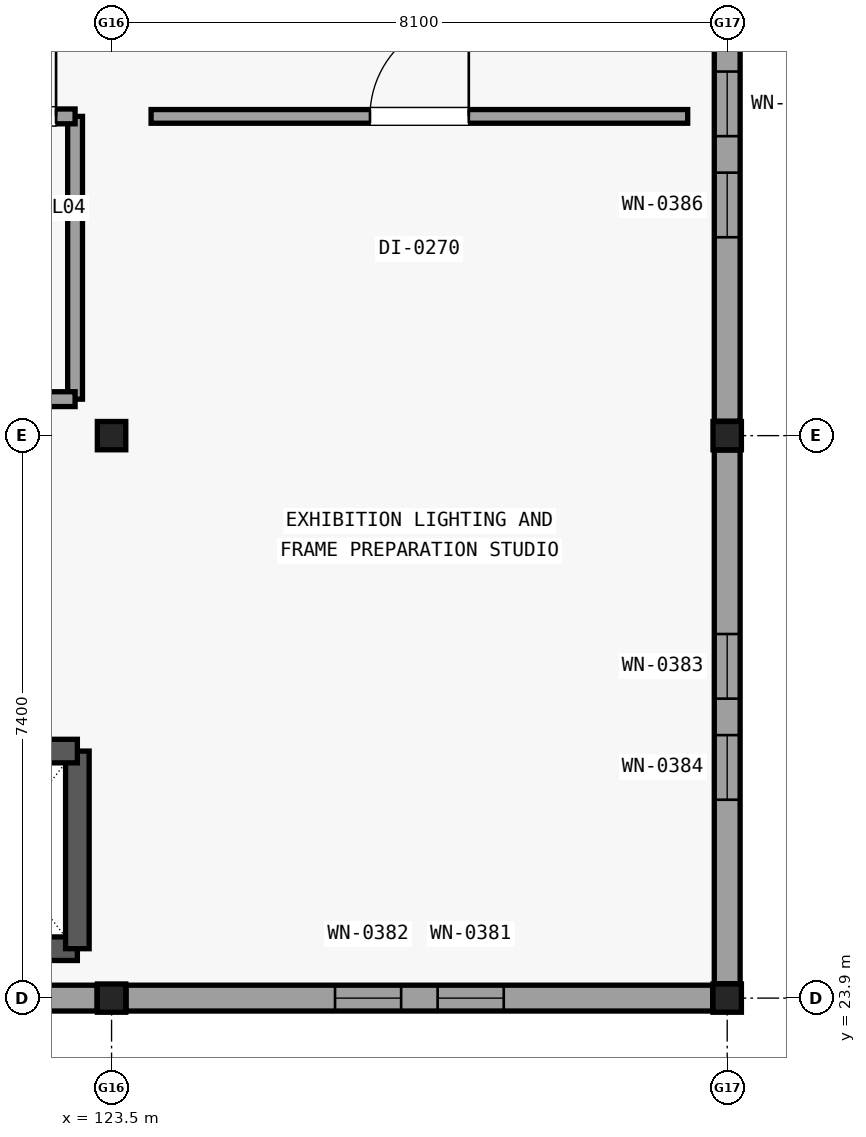
"""IFC4 building model, lengths in metres.
Left out: names, types, materials, properties, quantities, classifications, styles, units other than length and angle.
Written with IfcOpenShell. Run it as: python <this file> out.ifc"""

import sys

from ifc_helpers import new_model, si_unit, direction, frame, frame_2d, origin, origin_2d, place, context, subcontext, project, spatial, rectangle, i_section, extrude, element, fill, save


model = new_model("IFC4")
c1 = context("Model", 3, precision=1e-05, world=origin(), true_north=direction((0.0, 1.0)))
c2 = subcontext(c1, "Body", "Model", "MODEL_VIEW")
j1 = project(units=[si_unit("LENGTHUNIT", "METRE"), si_unit("PLANEANGLEUNIT", "RADIAN")], contexts=[c1])
p1 = place(None, origin())
s1 = spatial("IfcSite", under=j1, at=p1, CompositionType="ELEMENT")
p2 = place(p1, origin())
s2 = spatial("IfcBuilding", under=s1, at=p2, CompositionType="ELEMENT")
p3 = place(p2, frame((0.0, 0.0, 17.4)))
s3 = spatial("IfcBuildingStorey", under=s2, at=p3, CompositionType="ELEMENT", Elevation=17.4)
for number, where, z_axis, x_axis in (
    (1, (123.5, 23.9, 0.0), (0.0, 0.0, 1.0), (1.0, 0.0, 0.0)),
    (2, (123.5, 31.3, 0.0), (0.0, 0.0, 1.0), (1.0, 0.0, 0.0)),
    (3, (131.6, 23.9, 0.0), (0.0, 0.0, 1.0), (1.0, 0.0, 0.0)),
    (4, (131.6, 31.3, 0.0), (0.0, 0.0, 1.0), (1.0, 0.0, 0.0)),
):
    element("IfcColumn", number, at=place(p3, frame(where, z_axis=z_axis, x_axis=x_axis)), inside=s3, PredefinedType="COLUMN", context=c2, shape_type="SweptSolid", body=[
        extrude(i_section(OverallWidth=0.374, OverallDepth=0.372, WebThickness=0.016, FlangeThickness=0.026, at=origin_2d()), origin(), (0.0, 0.0, 1.0), 3.38),
    ])
p4 = place(p3, frame((123.309, 23.9, 0.0), z_axis=(0.0, 0.0, 1.0), x_axis=(-1.0, 0.0, 0.0)))
e5 = element("IfcWall", 5, at=p4, inside=s3, PredefinedType="SOLIDWALL", context=c2, shape_type="SweptSolid", body=[
    extrude(rectangle(XDim=7.718, YDim=0.34, at=frame_2d((3.859, 0.0))), origin(), (0.0, 0.0, 1.0), 2.908),
])
p5 = place(p4, frame((2.749, 0.0, 0.6)))
e6 = element("IfcOpeningElement", 6, at=p5, cuts=e5, PredefinedType="OPENING", context=c2, shape_type="SweptSolid", body=[
    extrude(rectangle(XDim=0.87, YDim=1.82, at=frame_2d((0.435, 0.91))), frame((0.0, 0.18, 0.0), z_axis=(0.0, -1.0, 0.0), x_axis=(1.0, 0.0, 0.0)), (0.0, 0.0, 1.0), 0.36),
])
p6 = place(p4, frame((4.099, 0.0, 0.6)))
e7 = element("IfcOpeningElement", 7, at=p6, cuts=e5, PredefinedType="OPENING", context=c2, shape_type="SweptSolid", body=[
    extrude(rectangle(XDim=0.87, YDim=1.82, at=frame_2d((0.435, 0.91))), frame((0.0, 0.18, 0.0), z_axis=(0.0, -1.0, 0.0), x_axis=(1.0, 0.0, 0.0)), (0.0, 0.0, 1.0), 0.36),
])
p7 = place(p3, frame((131.409, 23.9, 0.0), z_axis=(0.0, 0.0, 1.0), x_axis=(-1.0, 0.0, 0.0)))
e8 = element("IfcWall", 8, at=p7, inside=s3, PredefinedType="SOLIDWALL", context=c2, shape_type="SweptSolid", body=[
    extrude(rectangle(XDim=7.718, YDim=0.34, at=frame_2d((3.859, 0.0))), origin(), (0.0, 0.0, 1.0), 2.908),
])
p8 = place(p7, frame((2.749, 0.0, 0.6)))
e9 = element("IfcOpeningElement", 9, at=p8, cuts=e8, PredefinedType="OPENING", context=c2, shape_type="SweptSolid", body=[
    extrude(rectangle(XDim=0.87, YDim=1.82, at=frame_2d((0.435, 0.91))), frame((0.0, 0.18, 0.0), z_axis=(0.0, -1.0, 0.0), x_axis=(1.0, 0.0, 0.0)), (0.0, 0.0, 1.0), 0.36),
])
p9 = place(p7, frame((4.099, 0.0, 0.6)))
e10 = element("IfcOpeningElement", 10, at=p9, cuts=e8, PredefinedType="OPENING", context=c2, shape_type="SweptSolid", body=[
    extrude(rectangle(XDim=0.87, YDim=1.82, at=frame_2d((0.435, 0.91))), frame((0.0, 0.18, 0.0), z_axis=(0.0, -1.0, 0.0), x_axis=(1.0, 0.0, 0.0)), (0.0, 0.0, 1.0), 0.36),
])
p10 = place(p3, frame((131.6, 31.11, 0.0), z_axis=(0.0, 0.0, 1.0), x_axis=(0.0, -1.0, 0.0)))
e11 = element("IfcWall", 11, at=p10, inside=s3, PredefinedType="SOLIDWALL", context=c2, shape_type="SweptSolid", body=[
    extrude(rectangle(XDim=7.02, YDim=0.34, at=frame_2d((3.51, 0.0))), origin(), (0.0, 0.0, 1.0), 2.908),
])
p11 = place(p10, frame((2.42, 0.0, 0.6)))
e12 = element("IfcOpeningElement", 12, at=p11, cuts=e11, PredefinedType="OPENING", context=c2, shape_type="SweptSolid", body=[
    extrude(rectangle(XDim=0.85, YDim=1.88, at=frame_2d((0.425, 0.94))), frame((0.0, 0.18, 0.0), z_axis=(0.0, -1.0, 0.0), x_axis=(1.0, 0.0, 0.0)), (0.0, 0.0, 1.0), 0.36),
])
p12 = place(p10, frame((3.75, 0.0, 0.6)))
e13 = element("IfcOpeningElement", 13, at=p12, cuts=e11, PredefinedType="OPENING", context=c2, shape_type="SweptSolid", body=[
    extrude(rectangle(XDim=0.85, YDim=1.88, at=frame_2d((0.425, 0.94))), frame((0.0, 0.18, 0.0), z_axis=(0.0, -1.0, 0.0), x_axis=(1.0, 0.0, 0.0)), (0.0, 0.0, 1.0), 0.36),
])
p13 = place(p3, frame((131.6, 38.51, 0.0), z_axis=(0.0, 0.0, 1.0), x_axis=(0.0, -1.0, 0.0)))
e14 = element("IfcWall", 14, at=p13, inside=s3, PredefinedType="SOLIDWALL", context=c2, shape_type="SweptSolid", body=[
    extrude(rectangle(XDim=7.02, YDim=0.34, at=frame_2d((3.51, 0.0))), origin(), (0.0, 0.0, 1.0), 2.908),
])
p14 = place(p13, frame((2.42, 0.0, 0.6)))
e15 = element("IfcOpeningElement", 15, at=p14, cuts=e14, PredefinedType="OPENING", context=c2, shape_type="SweptSolid", body=[
    extrude(rectangle(XDim=0.85, YDim=1.88, at=frame_2d((0.425, 0.94))), frame((0.0, 0.18, 0.0), z_axis=(0.0, -1.0, 0.0), x_axis=(1.0, 0.0, 0.0)), (0.0, 0.0, 1.0), 0.36),
])
p15 = place(p13, frame((3.75, 0.0, 0.6)))
e16 = element("IfcOpeningElement", 16, at=p15, cuts=e14, PredefinedType="OPENING", context=c2, shape_type="SweptSolid", body=[
    extrude(rectangle(XDim=0.85, YDim=1.88, at=frame_2d((0.425, 0.94))), frame((0.0, 0.18, 0.0), z_axis=(0.0, -1.0, 0.0), x_axis=(1.0, 0.0, 0.0)), (0.0, 0.0, 1.0), 0.36),
])
p16 = place(p3, frame((120.95, 24.55, 0.0), z_axis=(0.0, 0.0, 1.0), x_axis=(1.0, 0.0, 0.0)))
e17 = element("IfcWall", 17, at=p16, inside=s3, PredefinedType="SHEAR", context=c2, shape_type="SweptSolid", body=[
    extrude(rectangle(XDim=2.1, YDim=0.31, at=frame_2d((1.05, 0.0))), origin(), (0.0, 0.0, 1.0), 3.375),
])
p17 = place(p3, frame((123.05, 24.55, 0.0), z_axis=(0.0, 0.0, 1.0), x_axis=(0.0, 1.0, 0.0)))
e18 = element("IfcWall", 18, at=p17, inside=s3, PredefinedType="SHEAR", context=c2, shape_type="SweptSolid", body=[
    extrude(rectangle(XDim=2.6, YDim=0.31, at=frame_2d((1.3, 0.0))), origin(), (0.0, 0.0, 1.0), 3.375),
])
p18 = place(p3, frame((120.95, 27.15, 0.0), z_axis=(0.0, 0.0, 1.0), x_axis=(1.0, 0.0, 0.0)))
e19 = element("IfcWall", 19, at=p18, inside=s3, PredefinedType="SHEAR", context=c2, shape_type="SweptSolid", body=[
    extrude(rectangle(XDim=2.1, YDim=0.31, at=frame_2d((1.05, 0.0))), origin(), (0.0, 0.0, 1.0), 3.375),
])
p19 = place(p18, frame((0.5, 0.0, 0.0)))
e20 = element("IfcOpeningElement", 20, at=p19, cuts=e19, PredefinedType="OPENING", context=c2, shape_type="SweptSolid", body=[
    extrude(rectangle(XDim=1.1, YDim=2.15, at=frame_2d((0.55, 1.075))), frame((0.0, 0.165, 0.0), z_axis=(0.0, -1.0, 0.0), x_axis=(1.0, 0.0, 0.0)), (0.0, 0.0, 1.0), 0.33),
])
p20 = place(p3, frame((123.02, 31.78, 0.0), z_axis=(0.0, 0.0, 1.0), x_axis=(0.0, 1.0, 0.0)))
e21 = element("IfcWall", 21, at=p20, inside=s3, PredefinedType="PARTITIONING", context=c2, shape_type="SweptSolid", body=[
    extrude(rectangle(XDim=3.72, YDim=0.195, at=frame_2d((1.86, 0.0))), origin(), (0.0, 0.0, 1.0), 2.913),
])
p21 = place(p3, frame((120.05, 31.78, 0.0), z_axis=(0.0, 0.0, 1.0), x_axis=(1.0, 0.0, 0.0)))
e22 = element("IfcWall", 22, at=p21, inside=s3, PredefinedType="PARTITIONING", context=c2, shape_type="SweptSolid", body=[
    extrude(rectangle(XDim=2.97, YDim=0.195, at=frame_2d((1.485, 0.0))), origin(), (0.0, 0.0, 1.0), 2.913),
])
p22 = place(p3, frame((120.05, 35.5, 0.0), z_axis=(0.0, 0.0, 1.0), x_axis=(1.0, 0.0, 0.0)))
e23 = element("IfcWall", 23, at=p22, inside=s3, PredefinedType="PARTITIONING", context=c2, shape_type="SweptSolid", body=[
    extrude(rectangle(XDim=2.97, YDim=0.195, at=frame_2d((1.485, 0.0))), origin(), (0.0, 0.0, 1.0), 2.913),
])
p23 = place(p22, frame((0.25, 0.0, 0.0)))
e24 = element("IfcOpeningElement", 24, at=p23, cuts=e23, PredefinedType="OPENING", context=c2, shape_type="SweptSolid", body=[
    extrude(rectangle(XDim=0.95, YDim=2.1, at=frame_2d((0.475, 1.05))), frame((0.0, 0.107, 0.0), z_axis=(0.0, -1.0, 0.0), x_axis=(1.0, 0.0, 0.0)), (0.0, 0.0, 1.0), 0.215),
])
p24 = place(p22, frame((1.82, 0.0, 0.0)))
e25 = element("IfcOpeningElement", 25, at=p24, cuts=e23, PredefinedType="OPENING", context=c2, shape_type="SweptSolid", body=[
    extrude(rectangle(XDim=0.9, YDim=2.1, at=frame_2d((0.45, 1.05))), frame((0.0, 0.107, 0.0), z_axis=(0.0, -1.0, 0.0), x_axis=(1.0, 0.0, 0.0)), (0.0, 0.0, 1.0), 0.215),
])
p25 = place(p3, frame((124.02, 35.5, 0.0), z_axis=(0.0, 0.0, 1.0), x_axis=(1.0, 0.0, 0.0)))
e26 = element("IfcWall", 26, at=p25, inside=s3, PredefinedType="PARTITIONING", context=c2, shape_type="SweptSolid", body=[
    extrude(rectangle(XDim=7.06, YDim=0.18, at=frame_2d((3.53, 0.0))), origin(), (0.0, 0.0, 1.0), 2.913),
])
p26 = place(p25, frame((2.88, 0.0, 0.0)))
e27 = element("IfcOpeningElement", 27, at=p26, cuts=e26, PredefinedType="OPENING", context=c2, shape_type="SweptSolid", body=[
    extrude(rectangle(XDim=1.3, YDim=2.2, at=frame_2d((0.65, 1.1))), frame((0.0, 0.1, 0.0), z_axis=(0.0, -1.0, 0.0), x_axis=(1.0, 0.0, 0.0)), (0.0, 0.0, 1.0), 0.2),
])
p27 = place(p8, origin())
e28 = element("IfcWindow", 28, at=p27, inside=s3, PartitioningType="SINGLE_PANEL", PredefinedType="WINDOW", context=c2, shape_type="SweptSolid", body=[
    extrude(rectangle(XDim=0.87, YDim=1.82, at=frame_2d((0.435, 0.91))), frame((0.0, 0.03, 0.0), z_axis=(0.0, -1.0, 0.0), x_axis=(1.0, 0.0, 0.0)), (0.0, 0.0, 1.0), 0.06),
])
fill(e9, e28)
p28 = place(p9, origin())
e29 = element("IfcWindow", 29, at=p28, inside=s3, PartitioningType="SINGLE_PANEL", PredefinedType="WINDOW", context=c2, shape_type="SweptSolid", body=[
    extrude(rectangle(XDim=0.87, YDim=1.82, at=frame_2d((0.435, 0.91))), frame((0.0, 0.03, 0.0), z_axis=(0.0, -1.0, 0.0), x_axis=(1.0, 0.0, 0.0)), (0.0, 0.0, 1.0), 0.06),
])
fill(e10, e29)
p29 = place(p11, origin())
e30 = element("IfcWindow", 30, at=p29, inside=s3, PartitioningType="SINGLE_PANEL", PredefinedType="WINDOW", context=c2, shape_type="SweptSolid", body=[
    extrude(rectangle(XDim=0.85, YDim=1.88, at=frame_2d((0.425, 0.94))), frame((0.0, 0.03, 0.0), z_axis=(0.0, -1.0, 0.0), x_axis=(1.0, 0.0, 0.0)), (0.0, 0.0, 1.0), 0.06),
])
fill(e12, e30)
p30 = place(p12, origin())
e31 = element("IfcWindow", 31, at=p30, inside=s3, PartitioningType="SINGLE_PANEL", PredefinedType="WINDOW", context=c2, shape_type="SweptSolid", body=[
    extrude(rectangle(XDim=0.85, YDim=1.88, at=frame_2d((0.425, 0.94))), frame((0.0, 0.03, 0.0), z_axis=(0.0, -1.0, 0.0), x_axis=(1.0, 0.0, 0.0)), (0.0, 0.0, 1.0), 0.06),
])
fill(e13, e31)
p31 = place(p14, origin())
e32 = element("IfcWindow", 32, at=p31, inside=s3, PartitioningType="SINGLE_PANEL", PredefinedType="WINDOW", context=c2, shape_type="SweptSolid", body=[
    extrude(rectangle(XDim=0.85, YDim=1.88, at=frame_2d((0.425, 0.94))), frame((0.0, 0.03, 0.0), z_axis=(0.0, -1.0, 0.0), x_axis=(1.0, 0.0, 0.0)), (0.0, 0.0, 1.0), 0.06),
])
fill(e15, e32)
p32 = place(p15, origin())
e33 = element("IfcWindow", 33, at=p32, inside=s3, PartitioningType="SINGLE_PANEL", PredefinedType="WINDOW", context=c2, shape_type="SweptSolid", body=[
    extrude(rectangle(XDim=0.85, YDim=1.88, at=frame_2d((0.425, 0.94))), frame((0.0, 0.03, 0.0), z_axis=(0.0, -1.0, 0.0), x_axis=(1.0, 0.0, 0.0)), (0.0, 0.0, 1.0), 0.06),
])
fill(e16, e33)
p33 = place(p24, origin())
e34 = element("IfcDoor", 34, at=p33, inside=s3, OperationType="SINGLE_SWING_RIGHT", PredefinedType="DOOR", context=c2, shape_type="SweptSolid", body=[
    extrude(rectangle(XDim=0.9, YDim=2.1, at=frame_2d((0.45, 1.05))), frame((0.0, 0.025, 0.0), z_axis=(0.0, -1.0, 0.0), x_axis=(1.0, 0.0, 0.0)), (0.0, 0.0, 1.0), 0.05),
])
fill(e25, e34)
p34 = place(p26, origin())
e35 = element("IfcDoor", 35, at=p34, inside=s3, OperationType="SINGLE_SWING_RIGHT", PredefinedType="DOOR", context=c2, shape_type="SweptSolid", body=[
    extrude(rectangle(XDim=1.3, YDim=2.2, at=frame_2d((0.65, 1.1))), frame((0.0, 0.025, 0.0), z_axis=(0.0, -1.0, 0.0), x_axis=(1.0, 0.0, 0.0)), (0.0, 0.0, 1.0), 0.05),
])
fill(e27, e35)
save(model, sys.argv[1])
